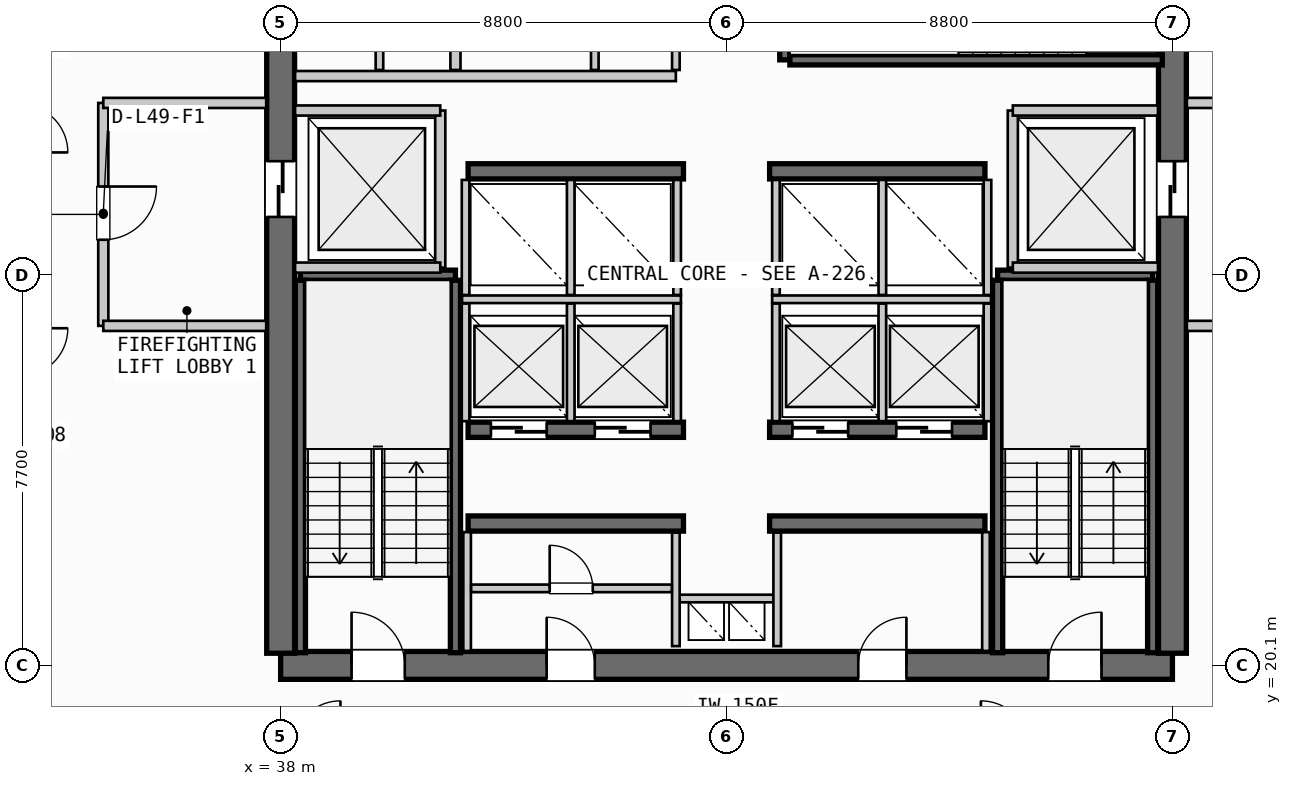
"""IFC4 building model, lengths in metres.
Left out: names, types, materials, properties, quantities, classifications, styles, units other than length and angle.
Written with IfcOpenShell. Run it as: python <this file> out.ifc"""

import sys

from ifc_helpers import new_model, si_unit, direction, frame, frame_2d, origin, place, context, subcontext, project, spatial, rectangle, extrude, source, transform, mapped, element, fill, save


model = new_model("IFC4")
c1 = context("Model", 3, precision=1e-05, world=origin(), true_north=direction((0.0, 1.0)))
c2 = subcontext(c1, "Body", "Model", "MODEL_VIEW")
j1 = project(units=[si_unit("LENGTHUNIT", "METRE"), si_unit("PLANEANGLEUNIT", "RADIAN")], contexts=[c1])
p1 = place(None, origin())
s1 = spatial("IfcSite", under=j1, at=p1, CompositionType="ELEMENT")
p2 = place(p1, origin())
s2 = spatial("IfcBuilding", under=s1, at=p2, CompositionType="ELEMENT")
p3 = place(p2, frame((0.0, 0.0, 190.4)))
s3 = spatial("IfcBuildingStorey", under=s2, at=p3, CompositionType="ELEMENT", Elevation=190.4)
p4 = place(p3, frame((38.0, 20.1, 0.0), z_axis=(0.0, 0.0, 1.0), x_axis=(1.0, 0.0, 0.0)))
e1 = element("IfcWall", 1, at=p4, inside=s3, PredefinedType="SHEAR", context=c2, shape_type="SweptSolid", body=[
    extrude(rectangle(XDim=17.6, YDim=0.55, at=frame_2d((8.8, 0.0))), origin(), (0.0, 0.0, 1.0), 3.26),
])
p5 = place(p4, frame((1.4, 0.0, 0.0)))
e2 = element("IfcOpeningElement", 2, at=p5, cuts=e1, PredefinedType="OPENING", context=c2, shape_type="SweptSolid", body=[
    extrude(rectangle(XDim=1.05, YDim=2.15, at=frame_2d((0.525, 1.075))), frame((0.0, 0.285, 0.0), z_axis=(0.0, -1.0, 0.0), x_axis=(1.0, 0.0, 0.0)), (0.0, 0.0, 1.0), 0.57),
])
p6 = place(p4, frame((15.15, 0.0, 0.0)))
e3 = element("IfcOpeningElement", 3, at=p6, cuts=e1, PredefinedType="OPENING", context=c2, shape_type="SweptSolid", body=[
    extrude(rectangle(XDim=1.05, YDim=2.15, at=frame_2d((0.525, 1.075))), frame((0.0, 0.285, 0.0), z_axis=(0.0, -1.0, 0.0), x_axis=(1.0, 0.0, 0.0)), (0.0, 0.0, 1.0), 0.57),
])
p7 = place(p4, frame((5.25, 0.0, 0.0)))
e4 = element("IfcOpeningElement", 4, at=p7, cuts=e1, PredefinedType="OPENING", context=c2, shape_type="SweptSolid", body=[
    extrude(rectangle(XDim=0.95, YDim=2.15, at=frame_2d((0.475, 1.075))), frame((0.0, 0.285, 0.0), z_axis=(0.0, -1.0, 0.0), x_axis=(1.0, 0.0, 0.0)), (0.0, 0.0, 1.0), 0.57),
])
p8 = place(p4, frame((11.4, 0.0, 0.0)))
e5 = element("IfcOpeningElement", 5, at=p8, cuts=e1, PredefinedType="OPENING", context=c2, shape_type="SweptSolid", body=[
    extrude(rectangle(XDim=0.95, YDim=2.15, at=frame_2d((0.475, 1.075))), frame((0.0, 0.285, 0.0), z_axis=(0.0, -1.0, 0.0), x_axis=(1.0, 0.0, 0.0)), (0.0, 0.0, 1.0), 0.57),
])
p9 = place(p3, frame((38.0, 35.26, 0.0), z_axis=(0.0, 0.0, 1.0), x_axis=(0.0, -1.0, 0.0)))
e6 = element("IfcWall", 6, at=p9, inside=s3, PredefinedType="SHEAR", context=c2, shape_type="SweptSolid", body=[
    extrude(rectangle(XDim=14.92, YDim=0.55, at=frame_2d((7.46, 0.0))), origin(), (0.0, 0.0, 1.0), 3.26),
])
p10 = place(p9, frame((5.21, 0.0, 0.0)))
e7 = element("IfcOpeningElement", 7, at=p10, cuts=e6, PredefinedType="OPENING", context=c2, shape_type="SweptSolid", body=[
    extrude(rectangle(XDim=1.1, YDim=2.2, at=frame_2d((0.55, 1.1))), frame((0.0, 0.285, 0.0), z_axis=(0.0, -1.0, 0.0), x_axis=(1.0, 0.0, 0.0)), (0.0, 0.0, 1.0), 0.57),
])
p11 = place(p3, frame((55.6, 20.34, 0.0), z_axis=(0.0, 0.0, 1.0), x_axis=(0.0, 1.0, 0.0)))
e8 = element("IfcWall", 8, at=p11, inside=s3, PredefinedType="SHEAR", context=c2, shape_type="SweptSolid", body=[
    extrude(rectangle(XDim=14.92, YDim=0.55, at=frame_2d((7.46, 0.0))), origin(), (0.0, 0.0, 1.0), 3.26),
])
p12 = place(p11, frame((12.71, 0.0, 0.0)))
e9 = element("IfcOpeningElement", 9, at=p12, cuts=e8, PredefinedType="OPENING", context=c2, shape_type="SweptSolid", body=[
    extrude(rectangle(XDim=1.05, YDim=2.15, at=frame_2d((0.525, 1.075))), frame((0.0, 0.285, 0.0), z_axis=(0.0, -1.0, 0.0), x_axis=(1.0, 0.0, 0.0)), (0.0, 0.0, 1.0), 0.57),
])
p13 = place(p11, frame((8.61, 0.0, 0.0)))
e10 = element("IfcOpeningElement", 10, at=p13, cuts=e8, PredefinedType="OPENING", context=c2, shape_type="SweptSolid", body=[
    extrude(rectangle(XDim=1.1, YDim=2.2, at=frame_2d((0.55, 1.1))), frame((0.0, 0.285, 0.0), z_axis=(0.0, -1.0, 0.0), x_axis=(1.0, 0.0, 0.0)), (0.0, 0.0, 1.0), 0.57),
])
for number, where, z_axis, x_axis in (
    (11, (41.7, 22.9, 0.0), (0.0, 0.0, 1.0), (1.0, 0.0, 0.0)),
    (12, (47.65, 22.9, 0.0), (0.0, 0.0, 1.0), (1.0, 0.0, 0.0)),
):
    element("IfcWall", number, at=place(p3, frame(where, z_axis=z_axis, x_axis=x_axis)), inside=s3, PredefinedType="SHEAR", context=c2, shape_type="SweptSolid", body=[
        extrude(rectangle(XDim=4.25, YDim=0.3, at=frame_2d((2.125, 0.0))), origin(), (0.0, 0.0, 1.0), 3.26),
    ])
p14 = place(p3, frame((41.7, 24.75, 0.0), z_axis=(0.0, 0.0, 1.0), x_axis=(1.0, 0.0, 0.0)))
e13 = element("IfcWall", 13, at=p14, inside=s3, PredefinedType="SHEAR", context=c2, shape_type="SweptSolid", body=[
    extrude(rectangle(XDim=4.25, YDim=0.3, at=frame_2d((2.125, 0.0))), origin(), (0.0, 0.0, 1.0), 3.26),
])
p15 = place(p14, frame((0.45, 0.0, 0.0)))
e14 = element("IfcOpeningElement", 14, at=p15, cuts=e13, PredefinedType="OPENING", context=c2, shape_type="SweptSolid", body=[
    extrude(rectangle(XDim=1.1, YDim=2.2, at=frame_2d((0.55, 1.1))), frame((0.0, 0.16, 0.0), z_axis=(0.0, -1.0, 0.0), x_axis=(1.0, 0.0, 0.0)), (0.0, 0.0, 1.0), 0.32),
])
p16 = place(p14, frame((2.5, 0.0, 0.0)))
e15 = element("IfcOpeningElement", 15, at=p16, cuts=e13, PredefinedType="OPENING", context=c2, shape_type="SweptSolid", body=[
    extrude(rectangle(XDim=1.1, YDim=2.2, at=frame_2d((0.55, 1.1))), frame((0.0, 0.16, 0.0), z_axis=(0.0, -1.0, 0.0), x_axis=(1.0, 0.0, 0.0)), (0.0, 0.0, 1.0), 0.32),
])
p17 = place(p3, frame((47.65, 24.75, 0.0), z_axis=(0.0, 0.0, 1.0), x_axis=(1.0, 0.0, 0.0)))
e16 = element("IfcWall", 16, at=p17, inside=s3, PredefinedType="SHEAR", context=c2, shape_type="SweptSolid", body=[
    extrude(rectangle(XDim=4.25, YDim=0.3, at=frame_2d((2.125, 0.0))), origin(), (0.0, 0.0, 1.0), 3.26),
])
p18 = place(p17, frame((0.45, 0.0, 0.0)))
e17 = element("IfcOpeningElement", 17, at=p18, cuts=e16, PredefinedType="OPENING", context=c2, shape_type="SweptSolid", body=[
    extrude(rectangle(XDim=1.1, YDim=2.2, at=frame_2d((0.55, 1.1))), frame((0.0, 0.16, 0.0), z_axis=(0.0, -1.0, 0.0), x_axis=(1.0, 0.0, 0.0)), (0.0, 0.0, 1.0), 0.32),
])
p19 = place(p17, frame((2.5, 0.0, 0.0)))
e18 = element("IfcOpeningElement", 18, at=p19, cuts=e16, PredefinedType="OPENING", context=c2, shape_type="SweptSolid", body=[
    extrude(rectangle(XDim=1.1, YDim=2.2, at=frame_2d((0.55, 1.1))), frame((0.0, 0.16, 0.0), z_axis=(0.0, -1.0, 0.0), x_axis=(1.0, 0.0, 0.0)), (0.0, 0.0, 1.0), 0.32),
])
for number, where, z_axis, x_axis in (
    (19, (41.7, 29.85, 0.0), (0.0, 0.0, 1.0), (1.0, 0.0, 0.0)),
    (20, (47.65, 29.85, 0.0), (0.0, 0.0, 1.0), (1.0, 0.0, 0.0)),
):
    element("IfcWall", number, at=place(p3, frame(where, z_axis=z_axis, x_axis=x_axis)), inside=s3, PredefinedType="SHEAR", context=c2, shape_type="SweptSolid", body=[
        extrude(rectangle(XDim=4.25, YDim=0.3, at=frame_2d((2.125, 0.0))), origin(), (0.0, 0.0, 1.0), 3.26),
    ])
p20 = place(p3, frame((38.39, 27.8, 0.0), z_axis=(0.0, 0.0, 1.0), x_axis=(1.0, 0.0, 0.0)))
e21 = element("IfcWall", 21, at=p20, inside=s3, PredefinedType="SHEAR", context=c2, shape_type="SweptSolid", body=[
    extrude(rectangle(XDim=3.06, YDim=0.2, at=frame_2d((1.53, 0.0))), origin(), (0.0, 0.0, 1.0), 3.26),
])
for number, where, z_axis, x_axis in (
    (22, (41.45, 27.7, 0.0), (0.0, 0.0, 1.0), (0.0, -1.0, 0.0)),
    (23, (38.39, 20.35, 0.0), (0.0, 0.0, 1.0), (0.0, 1.0, 0.0)),
):
    element("IfcWall", number, at=place(p3, frame(where, z_axis=z_axis, x_axis=x_axis)), inside=s3, PredefinedType="SHEAR", context=c2, shape_type="SweptSolid", body=[
        extrude(rectangle(XDim=7.35, YDim=0.2, at=frame_2d((3.675, 0.0))), origin(), (0.0, 0.0, 1.0), 3.26),
    ])
p21 = place(p3, frame((52.15, 27.8, 0.0), z_axis=(0.0, 0.0, 1.0), x_axis=(1.0, 0.0, 0.0)))
e24 = element("IfcWall", 24, at=p21, inside=s3, PredefinedType="SHEAR", context=c2, shape_type="SweptSolid", body=[
    extrude(rectangle(XDim=3.06, YDim=0.2, at=frame_2d((1.53, 0.0))), origin(), (0.0, 0.0, 1.0), 3.26),
])
for number, where, z_axis, x_axis in (
    (25, (55.21, 27.7, 0.0), (0.0, 0.0, 1.0), (0.0, -1.0, 0.0)),
    (26, (52.15, 20.35, 0.0), (0.0, 0.0, 1.0), (0.0, 1.0, 0.0)),
):
    element("IfcWall", number, at=place(p3, frame(where, z_axis=z_axis, x_axis=x_axis)), inside=s3, PredefinedType="SHEAR", context=c2, shape_type="SweptSolid", body=[
        extrude(rectangle(XDim=7.35, YDim=0.2, at=frame_2d((3.675, 0.0))), origin(), (0.0, 0.0, 1.0), 3.26),
    ])
p22 = place(p3, frame((47.95, 32.05, 0.0), z_axis=(0.0, 0.0, 1.0), x_axis=(0.0, 1.0, 0.0)))
e27 = element("IfcWall", 27, at=p22, inside=s3, PredefinedType="SHEAR", context=c2, shape_type="SweptSolid", body=[
    extrude(rectangle(XDim=3.06, YDim=0.2, at=frame_2d((1.53, 0.0))), origin(), (0.0, 0.0, 1.0), 3.26),
])
p23 = place(p3, frame((55.4, 32.05, 0.0), z_axis=(0.0, 0.0, 1.0), x_axis=(-1.0, 0.0, 0.0)))
e28 = element("IfcWall", 28, at=p23, inside=s3, PredefinedType="SHEAR", context=c2, shape_type="SweptSolid", body=[
    extrude(rectangle(XDim=7.35, YDim=0.2, at=frame_2d((3.675, 0.0))), origin(), (0.0, 0.0, 1.0), 3.26),
])
p24 = place(p3, frame((45.8, 21.42, 0.0), z_axis=(0.0, 0.0, 1.0), x_axis=(1.0, 0.0, 0.0)))
e29 = element("IfcWall", 29, at=p24, inside=s3, PredefinedType="PARTITIONING", context=c2, shape_type="SweptSolid", body=[
    extrude(rectangle(XDim=2.0, YDim=0.15, at=frame_2d((1.0, 0.0))), origin(), (0.0, 0.0, 1.0), 2.735),
])
for number, where, z_axis, x_axis in (
    (30, (45.8, 20.48, 0.0), (0.0, 0.0, 1.0), (0.0, 1.0, 0.0)),
    (31, (47.8, 20.48, 0.0), (0.0, 0.0, 1.0), (0.0, 1.0, 0.0)),
):
    element("IfcWall", number, at=place(p3, frame(where, z_axis=z_axis, x_axis=x_axis)), inside=s3, PredefinedType="PARTITIONING", context=c2, shape_type="SweptSolid", body=[
        extrude(rectangle(XDim=2.24, YDim=0.15, at=frame_2d((1.12, 0.0))), origin(), (0.0, 0.0, 1.0), 2.735),
    ])
p25 = place(p3, frame((41.15, 27.95, 0.0), z_axis=(0.0, 0.0, 1.0), x_axis=(0.0, 1.0, 0.0)))
e32 = element("IfcWall", 32, at=p25, inside=s3, PredefinedType="PARTITIONING", context=c2, shape_type="SweptSolid", body=[
    extrude(rectangle(XDim=3.1, YDim=0.2, at=frame_2d((1.55, 0.0))), origin(), (0.0, 0.0, 1.0), 2.735),
])
for number, where, z_axis, x_axis in (
    (33, (38.285, 27.95, 0.0), (0.0, 0.0, 1.0), (1.0, 0.0, 0.0)),
    (34, (38.285, 31.05, 0.0), (0.0, 0.0, 1.0), (1.0, 0.0, 0.0)),
):
    element("IfcWall", number, at=place(p3, frame(where, z_axis=z_axis, x_axis=x_axis)), inside=s3, PredefinedType="PARTITIONING", context=c2, shape_type="SweptSolid", body=[
        extrude(rectangle(XDim=2.865, YDim=0.2, at=frame_2d((1.433, 0.0))), origin(), (0.0, 0.0, 1.0), 2.735),
    ])
p26 = place(p3, frame((34.5, 31.2, 0.0), z_axis=(0.0, 0.0, 1.0), x_axis=(0.0, -1.0, 0.0)))
e35 = element("IfcWall", 35, at=p26, inside=s3, PredefinedType="PARTITIONING", context=c2, shape_type="SweptSolid", body=[
    extrude(rectangle(XDim=4.4, YDim=0.2, at=frame_2d((2.2, 0.0))), origin(), (0.0, 0.0, 1.0), 2.735),
])
p27 = place(p26, frame((1.65, 0.0, 0.0)))
e36 = element("IfcOpeningElement", 36, at=p27, cuts=e35, PredefinedType="OPENING", context=c2, shape_type="SweptSolid", body=[
    extrude(rectangle(XDim=1.05, YDim=2.15, at=frame_2d((0.525, 1.075))), frame((0.0, 0.11, 0.0), z_axis=(0.0, -1.0, 0.0), x_axis=(1.0, 0.0, 0.0)), (0.0, 0.0, 1.0), 0.22),
])
for number, where, z_axis, x_axis in (
    (37, (34.5, 26.8, 0.0), (0.0, 0.0, 1.0), (1.0, 0.0, 0.0)),
    (38, (34.5, 31.2, 0.0), (0.0, 0.0, 1.0), (1.0, 0.0, 0.0)),
):
    element("IfcWall", number, at=place(p3, frame(where, z_axis=z_axis, x_axis=x_axis)), inside=s3, PredefinedType="PARTITIONING", context=c2, shape_type="SweptSolid", body=[
        extrude(rectangle(XDim=3.215, YDim=0.2, at=frame_2d((1.607, 0.0))), origin(), (0.0, 0.0, 1.0), 2.735),
    ])
p28 = place(p3, frame((52.45, 27.95, 0.0), z_axis=(0.0, 0.0, 1.0), x_axis=(0.0, 1.0, 0.0)))
e39 = element("IfcWall", 39, at=p28, inside=s3, PredefinedType="PARTITIONING", context=c2, shape_type="SweptSolid", body=[
    extrude(rectangle(XDim=3.1, YDim=0.2, at=frame_2d((1.55, 0.0))), origin(), (0.0, 0.0, 1.0), 2.735),
])
for number, where, z_axis, x_axis in (
    (40, (52.45, 27.95, 0.0), (0.0, 0.0, 1.0), (1.0, 0.0, 0.0)),
    (41, (52.45, 31.05, 0.0), (0.0, 0.0, 1.0), (1.0, 0.0, 0.0)),
):
    element("IfcWall", number, at=place(p3, frame(where, z_axis=z_axis, x_axis=x_axis)), inside=s3, PredefinedType="PARTITIONING", context=c2, shape_type="SweptSolid", body=[
        extrude(rectangle(XDim=2.865, YDim=0.2, at=frame_2d((1.433, 0.0))), origin(), (0.0, 0.0, 1.0), 2.735),
    ])
for number, where, z_axis, x_axis in (
    (42, (55.885, 26.8, 0.0), (0.0, 0.0, 1.0), (1.0, 0.0, 0.0)),
    (43, (55.885, 31.2, 0.0), (0.0, 0.0, 1.0), (1.0, 0.0, 0.0)),
):
    element("IfcWall", number, at=place(p3, frame(where, z_axis=z_axis, x_axis=x_axis)), inside=s3, PredefinedType="PARTITIONING", context=c2, shape_type="SweptSolid", body=[
        extrude(rectangle(XDim=3.215, YDim=0.2, at=frame_2d((1.607, 0.0))), origin(), (0.0, 0.0, 1.0), 2.735),
    ])
for number, where, z_axis, x_axis in (
    (44, (41.68, 20.385, 0.0), (0.0, 0.0, 1.0), (0.0, 1.0, 0.0)),
    (45, (51.92, 20.385, 0.0), (0.0, 0.0, 1.0), (0.0, 1.0, 0.0)),
):
    element("IfcWall", number, at=place(p3, frame(where, z_axis=z_axis, x_axis=x_axis)), inside=s3, PredefinedType="PARTITIONING", context=c2, shape_type="SweptSolid", body=[
        extrude(rectangle(XDim=2.345, YDim=0.15, at=frame_2d((1.172, 0.0))), origin(), (0.0, 0.0, 1.0), 2.735),
    ])
p29 = place(p3, frame((41.76, 21.62, 0.0), z_axis=(0.0, 0.0, 1.0), x_axis=(1.0, 0.0, 0.0)))
e46 = element("IfcWall", 46, at=p29, inside=s3, PredefinedType="PARTITIONING", context=c2, shape_type="SweptSolid", body=[
    extrude(rectangle(XDim=3.96, YDim=0.15, at=frame_2d((1.98, 0.0))), origin(), (0.0, 0.0, 1.0), 2.735),
])
p30 = place(p29, frame((1.55, 0.0, 0.0)))
e47 = element("IfcOpeningElement", 47, at=p30, cuts=e46, PredefinedType="OPENING", context=c2, shape_type="SweptSolid", body=[
    extrude(rectangle(XDim=0.85, YDim=2.15, at=frame_2d((0.425, 1.075))), frame((0.0, 0.085, 0.0), z_axis=(0.0, -1.0, 0.0), x_axis=(1.0, 0.0, 0.0)), (0.0, 0.0, 1.0), 0.17),
])
p31 = place(p3, frame((41.58, 27.325, 0.0), z_axis=(0.0, 0.0, 1.0), x_axis=(1.0, 0.0, 0.0)))
e48 = element("IfcWall", 48, at=p31, inside=s3, PredefinedType="PARTITIONING", context=c2, shape_type="SweptSolid", body=[
    extrude(rectangle(XDim=4.32, YDim=0.15, at=frame_2d((2.16, 0.0))), origin(), (0.0, 0.0, 1.0), 2.735),
])
p32 = place(p3, frame((47.7, 27.325, 0.0), z_axis=(0.0, 0.0, 1.0), x_axis=(1.0, 0.0, 0.0)))
e49 = element("IfcWall", 49, at=p32, inside=s3, PredefinedType="PARTITIONING", context=c2, shape_type="SweptSolid", body=[
    extrude(rectangle(XDim=4.32, YDim=0.15, at=frame_2d((2.16, 0.0))), origin(), (0.0, 0.0, 1.0), 2.735),
])
for number, where, z_axis, x_axis in (
    (50, (41.65, 24.92, 0.0), (0.0, 0.0, 1.0), (0.0, 1.0, 0.0)),
    (51, (43.725, 24.92, 0.0), (0.0, 0.0, 1.0), (0.0, 1.0, 0.0)),
    (52, (45.825, 24.92, 0.0), (0.0, 0.0, 1.0), (0.0, 1.0, 0.0)),
    (53, (47.775, 24.92, 0.0), (0.0, 0.0, 1.0), (0.0, 1.0, 0.0)),
    (54, (49.875, 24.92, 0.0), (0.0, 0.0, 1.0), (0.0, 1.0, 0.0)),
    (55, (51.95, 24.92, 0.0), (0.0, 0.0, 1.0), (0.0, 1.0, 0.0)),
):
    element("IfcWall", number, at=place(p3, frame(where, z_axis=z_axis, x_axis=x_axis)), inside=s3, PredefinedType="PARTITIONING", context=c2, shape_type="SweptSolid", body=[
        extrude(rectangle(XDim=2.32, YDim=0.15, at=frame_2d((1.16, 0.0))), origin(), (0.0, 0.0, 1.0), 2.735),
    ])
for number, where, z_axis, x_axis in (
    (56, (41.65, 27.41, 0.0), (0.0, 0.0, 1.0), (0.0, 1.0, 0.0)),
    (57, (43.725, 27.41, 0.0), (0.0, 0.0, 1.0), (0.0, 1.0, 0.0)),
    (58, (45.825, 27.41, 0.0), (0.0, 0.0, 1.0), (0.0, 1.0, 0.0)),
    (59, (47.775, 27.41, 0.0), (0.0, 0.0, 1.0), (0.0, 1.0, 0.0)),
    (60, (49.875, 27.41, 0.0), (0.0, 0.0, 1.0), (0.0, 1.0, 0.0)),
    (61, (51.95, 27.41, 0.0), (0.0, 0.0, 1.0), (0.0, 1.0, 0.0)),
):
    element("IfcWall", number, at=place(p3, frame(where, z_axis=z_axis, x_axis=x_axis)), inside=s3, PredefinedType="PARTITIONING", context=c2, shape_type="SweptSolid", body=[
        extrude(rectangle(XDim=2.27, YDim=0.15, at=frame_2d((1.135, 0.0))), origin(), (0.0, 0.0, 1.0), 2.735),
    ])
p33 = place(p3, frame((41.45, 31.85, 0.0), z_axis=(0.0, 0.0, 1.0), x_axis=(0.0, 1.0, 0.0)))
e62 = element("IfcWall", 62, at=p33, inside=s3, PredefinedType="PARTITIONING", context=c2, shape_type="SweptSolid", body=[
    extrude(rectangle(XDim=3.365, YDim=0.2, at=frame_2d((1.683, 0.0))), origin(), (0.0, 0.0, 1.0), 2.735),
])
p34 = place(p3, frame((38.285, 31.73, 0.0), z_axis=(0.0, 0.0, 1.0), x_axis=(1.0, 0.0, 0.0)))
e63 = element("IfcWall", 63, at=p34, inside=s3, PredefinedType="PARTITIONING", context=c2, shape_type="SweptSolid", body=[
    extrude(rectangle(XDim=7.515, YDim=0.2, at=frame_2d((3.758, 0.0))), origin(), (0.0, 0.0, 1.0), 2.735),
])
for number, where, z_axis, x_axis in (
    (64, (45.8, 31.85, 0.0), (0.0, 0.0, 1.0), (0.0, 1.0, 0.0)),
    (65, (39.95, 31.85, 0.0), (0.0, 0.0, 1.0), (0.0, 1.0, 0.0)),
):
    element("IfcWall", number, at=place(p3, frame(where, z_axis=z_axis, x_axis=x_axis)), inside=s3, PredefinedType="PARTITIONING", context=c2, shape_type="SweptSolid", body=[
        extrude(rectangle(XDim=3.365, YDim=0.15, at=frame_2d((1.683, 0.0))), origin(), (0.0, 0.0, 1.0), 2.735),
    ])
p35 = place(p3, frame((44.2, 31.85, 0.0), z_axis=(0.0, 0.0, 1.0), x_axis=(0.0, 1.0, 0.0)))
e66 = element("IfcWall", 66, at=p35, inside=s3, PredefinedType="PLUMBINGWALL", context=c2, shape_type="SweptSolid", body=[
    extrude(rectangle(XDim=3.365, YDim=0.15, at=frame_2d((1.683, 0.0))), origin(), (0.0, 0.0, 1.0), 2.735),
])
m1 = source(origin(), c2, "Body", "SweptSolid", [
    extrude(rectangle(XDim=1.05, YDim=2.15, at=frame_2d((0.525, 1.075))), frame((0.0, 0.025, 0.0), z_axis=(0.0, -1.0, 0.0), x_axis=(1.0, 0.0, 0.0)), (0.0, 0.0, 1.0), 0.05),
])
p36 = place(p5, origin())
e67 = element("IfcDoor", 67, at=p36, inside=s3, OperationType="SINGLE_SWING_LEFT", PredefinedType="DOOR", context=c2, shape_type="MappedRepresentation", body=[
    mapped(m1, transform((0.0, 0.0, 0.0), scale=1.0)),
])
fill(e2, e67)
p37 = place(p6, origin())
e68 = element("IfcDoor", 68, at=p37, inside=s3, OperationType="SINGLE_SWING_RIGHT", PredefinedType="DOOR", context=c2, shape_type="MappedRepresentation", body=[
    mapped(m1, transform((0.0, 0.0, 0.0), scale=1.0)),
])
fill(e3, e68)
m2 = source(origin(), c2, "Body", "SweptSolid", [
    extrude(rectangle(XDim=1.1, YDim=2.2, at=frame_2d((0.55, 1.1))), frame((0.0, 0.025, 0.0), z_axis=(0.0, -1.0, 0.0), x_axis=(1.0, 0.0, 0.0)), (0.0, 0.0, 1.0), 0.05),
])
p38 = place(p10, origin())
e69 = element("IfcDoor", 69, at=p38, inside=s3, OperationType="SLIDING_TO_LEFT", PredefinedType="DOOR", context=c2, shape_type="MappedRepresentation", body=[
    mapped(m2, transform((0.0, 0.0, 0.0), scale=1.0)),
])
fill(e7, e69)
p39 = place(p13, origin())
e70 = element("IfcDoor", 70, at=p39, inside=s3, OperationType="SLIDING_TO_RIGHT", PredefinedType="DOOR", context=c2, shape_type="MappedRepresentation", body=[
    mapped(m2, transform((0.0, 0.0, 0.0), scale=1.0)),
])
fill(e10, e70)
m3 = source(origin(), c2, "Body", "SweptSolid", [
    extrude(rectangle(XDim=0.95, YDim=2.15, at=frame_2d((0.475, 1.075))), frame((0.0, 0.025, 0.0), z_axis=(0.0, -1.0, 0.0), x_axis=(1.0, 0.0, 0.0)), (0.0, 0.0, 1.0), 0.05),
])
p40 = place(p7, origin())
e71 = element("IfcDoor", 71, at=p40, inside=s3, OperationType="SINGLE_SWING_LEFT", PredefinedType="DOOR", context=c2, shape_type="MappedRepresentation", body=[
    mapped(m3, transform((0.0, 0.0, 0.0), scale=1.0)),
])
fill(e4, e71)
p41 = place(p8, origin())
e72 = element("IfcDoor", 72, at=p41, inside=s3, OperationType="SINGLE_SWING_RIGHT", PredefinedType="DOOR", context=c2, shape_type="MappedRepresentation", body=[
    mapped(m3, transform((0.0, 0.0, 0.0), scale=1.0)),
])
fill(e5, e72)
p42 = place(p15, origin())
e73 = element("IfcDoor", 73, at=p42, inside=s3, OperationType="SLIDING_TO_RIGHT", PredefinedType="DOOR", context=c2, shape_type="MappedRepresentation", body=[
    mapped(m2, transform((0.0, 0.0, 0.0), scale=1.0)),
])
fill(e14, e73)
p43 = place(p16, origin())
e74 = element("IfcDoor", 74, at=p43, inside=s3, OperationType="SLIDING_TO_RIGHT", PredefinedType="DOOR", context=c2, shape_type="MappedRepresentation", body=[
    mapped(m2, transform((0.0, 0.0, 0.0), scale=1.0)),
])
fill(e15, e74)
p44 = place(p18, origin())
e75 = element("IfcDoor", 75, at=p44, inside=s3, OperationType="SLIDING_TO_RIGHT", PredefinedType="DOOR", context=c2, shape_type="MappedRepresentation", body=[
    mapped(m2, transform((0.0, 0.0, 0.0), scale=1.0)),
])
fill(e17, e75)
p45 = place(p19, origin())
e76 = element("IfcDoor", 76, at=p45, inside=s3, OperationType="SLIDING_TO_RIGHT", PredefinedType="DOOR", context=c2, shape_type="MappedRepresentation", body=[
    mapped(m2, transform((0.0, 0.0, 0.0), scale=1.0)),
])
fill(e18, e76)
p46 = place(p27, origin())
e77 = element("IfcDoor", 77, at=p46, inside=s3, OperationType="SINGLE_SWING_LEFT", PredefinedType="DOOR", context=c2, shape_type="MappedRepresentation", body=[
    mapped(m1, transform((0.0, 0.0, 0.0), scale=1.0)),
])
fill(e36, e77)
m4 = source(origin(), c2, "Body", "SweptSolid", [
    extrude(rectangle(XDim=0.85, YDim=2.15, at=frame_2d((0.425, 1.075))), frame((0.0, 0.025, 0.0), z_axis=(0.0, -1.0, 0.0), x_axis=(1.0, 0.0, 0.0)), (0.0, 0.0, 1.0), 0.05),
])
p47 = place(p30, origin())
e78 = element("IfcDoor", 78, at=p47, inside=s3, OperationType="SINGLE_SWING_LEFT", PredefinedType="DOOR", context=c2, shape_type="MappedRepresentation", body=[
    mapped(m4, transform((0.0, 0.0, 0.0), scale=1.0)),
])
fill(e47, e78)
save(model, sys.argv[1])
